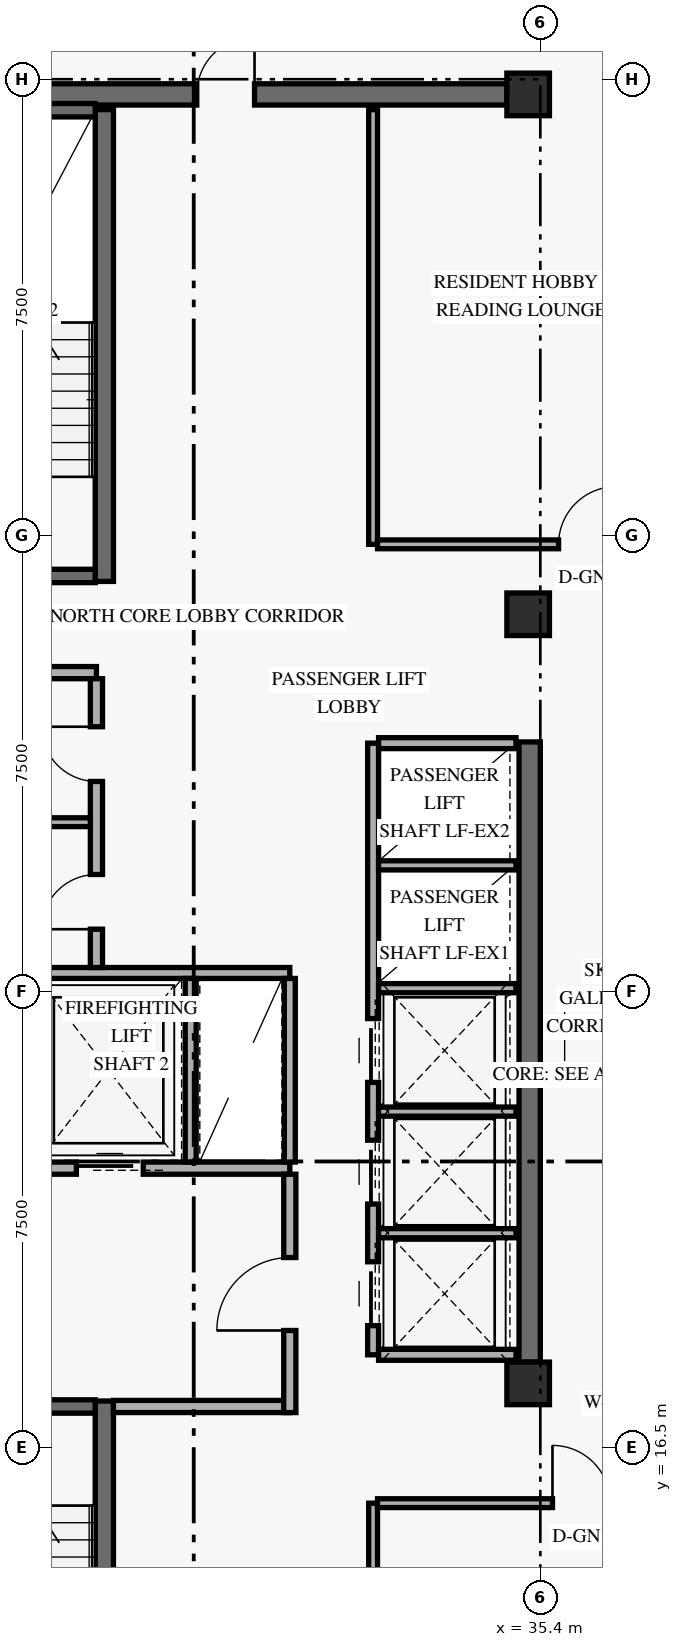
"""IFC4 building model, lengths in metres.
Left out: names, types, materials, properties, quantities, classifications, styles, units other than length and angle.
Written with IfcOpenShell. Run it as: python <this file> out.ifc"""

import sys

from ifc_helpers import new_model, si_unit, direction, frame, frame_2d, origin, origin_2d, place, context, subcontext, project, spatial, rectangle, extrude, element, fill, save


model = new_model("IFC4")
c1 = context("Model", 3, precision=1e-05, world=origin(), true_north=direction((0.0, 1.0)))
c2 = subcontext(c1, "Body", "Model", "MODEL_VIEW")
j1 = project(units=[si_unit("LENGTHUNIT", "METRE"), si_unit("PLANEANGLEUNIT", "RADIAN")], contexts=[c1])
p1 = place(None, origin())
s1 = spatial("IfcSite", under=j1, at=p1, CompositionType="ELEMENT")
p2 = place(p1, origin())
s2 = spatial("IfcBuilding", under=s1, at=p2, CompositionType="ELEMENT")
p3 = place(p2, frame((0.0, 0.0, 242.4)))
s3 = spatial("IfcBuildingStorey", under=s2, at=p3, CompositionType="ELEMENT", Elevation=242.4)
p4 = place(p3, frame((35.225, 17.9, 0.0), z_axis=(0.0, 0.0, 1.0), x_axis=(0.0, 1.0, 0.0)))
e1 = element("IfcWall", 1, at=p4, inside=s3, PredefinedType="SHEAR", context=c2, shape_type="SweptSolid", body=[
    extrude(rectangle(XDim=10.2, YDim=0.35, at=frame_2d((5.1, 0.0))), origin(), (0.0, 0.0, 1.0), 2.821),
])
p5 = place(p3, frame((24.55, 38.75, 0.0), z_axis=(0.0, 0.0, 1.0), x_axis=(1.0, 0.0, 0.0)))
e2 = element("IfcWall", 2, at=p5, inside=s3, PredefinedType="SHEAR", context=c2, shape_type="SweptSolid", body=[
    extrude(rectangle(XDim=10.3, YDim=0.35, at=frame_2d((5.15, 0.0))), origin(), (0.0, 0.0, 1.0), 3.36),
])
p6 = place(p5, frame((5.2, 0.0, 0.0)))
e3 = element("IfcOpeningElement", 3, at=p6, cuts=e2, PredefinedType="OPENING", context=c2, shape_type="SweptSolid", body=[
    extrude(rectangle(XDim=0.95, YDim=2.15, at=frame_2d((0.475, 1.075))), frame((0.0, 0.185, 0.0), z_axis=(0.0, -1.0, 0.0), x_axis=(1.0, 0.0, 0.0)), (0.0, 0.0, 1.0), 0.37),
])
p7 = place(p3, frame((28.23, 9.5, 0.0), z_axis=(0.0, 0.0, 1.0), x_axis=(0.0, 1.0, 0.0)))
e4 = element("IfcWall", 4, at=p7, inside=s3, PredefinedType="SHEAR", context=c2, shape_type="SweptSolid", body=[
    extrude(rectangle(XDim=7.76, YDim=0.3, at=frame_2d((3.88, 0.0))), origin(), (0.0, 0.0, 1.0), 3.36),
])
p8 = place(p3, frame((24.92, 17.17, 0.0), z_axis=(0.0, 0.0, 1.0), x_axis=(1.0, 0.0, 0.0)))
e5 = element("IfcWall", 5, at=p8, inside=s3, PredefinedType="SHEAR", context=c2, shape_type="SweptSolid", body=[
    extrude(rectangle(XDim=3.16, YDim=0.22, at=frame_2d((1.58, 0.0))), origin(), (0.0, 0.0, 1.0), 3.36),
])
p9 = place(p8, frame((0.78, 0.0, 0.0)))
e6 = element("IfcOpeningElement", 6, at=p9, cuts=e5, PredefinedType="OPENING", context=c2, shape_type="SweptSolid", body=[
    extrude(rectangle(XDim=1.05, YDim=2.15, at=frame_2d((0.525, 1.075))), frame((0.0, 0.12, 0.0), z_axis=(0.0, -1.0, 0.0), x_axis=(1.0, 0.0, 0.0)), (0.0, 0.0, 1.0), 0.24),
])
p10 = place(p3, frame((28.23, 30.74, 0.0), z_axis=(0.0, 0.0, 1.0), x_axis=(0.0, 1.0, 0.0)))
e7 = element("IfcWall", 7, at=p10, inside=s3, PredefinedType="SHEAR", context=c2, shape_type="SweptSolid", body=[
    extrude(rectangle(XDim=7.76, YDim=0.3, at=frame_2d((3.88, 0.0))), origin(), (0.0, 0.0, 1.0), 3.36),
])
p11 = place(p3, frame((24.92, 30.83, 0.0), z_axis=(0.0, 0.0, 1.0), x_axis=(1.0, 0.0, 0.0)))
e8 = element("IfcWall", 8, at=p11, inside=s3, PredefinedType="SHEAR", context=c2, shape_type="SweptSolid", body=[
    extrude(rectangle(XDim=3.16, YDim=0.22, at=frame_2d((1.58, 0.0))), origin(), (0.0, 0.0, 1.0), 3.36),
])
p12 = place(p11, frame((0.78, 0.0, 0.0)))
e9 = element("IfcOpeningElement", 9, at=p12, cuts=e8, PredefinedType="OPENING", context=c2, shape_type="SweptSolid", body=[
    extrude(rectangle(XDim=1.05, YDim=2.15, at=frame_2d((0.525, 1.075))), frame((0.0, 0.12, 0.0), z_axis=(0.0, -1.0, 0.0), x_axis=(1.0, 0.0, 0.0)), (0.0, 0.0, 1.0), 0.24),
])
p13 = place(p3, frame((24.92, 38.49, 0.0), z_axis=(0.0, 0.0, 1.0), x_axis=(1.0, 0.0, 0.0)))
e10 = element("IfcWall", 10, at=p13, inside=s3, PredefinedType="SHEAR", context=c2, shape_type="SweptSolid", body=[
    extrude(rectangle(XDim=3.16, YDim=0.22, at=frame_2d((1.58, 0.0))), origin(), (0.0, 0.0, 1.0), 3.36),
])
for number, where, z_axis, x_axis in (
    (11, (35.2, 17.55, 0.0), (0.0, 0.0, 1.0), (1.0, 0.0, 0.0)),
    (12, (35.2, 30.2, 0.0), (0.0, 0.0, 1.0), (1.0, 0.0, 0.0)),
    (13, (35.2, 38.75, 0.0), (0.0, 0.0, 1.0), (1.0, 0.0, 0.0)),
):
    element("IfcColumn", number, at=place(p3, frame(where, z_axis=z_axis, x_axis=x_axis)), inside=s3, PredefinedType="COLUMN", context=c2, shape_type="SweptSolid", body=[
        extrude(rectangle(XDim=0.7, YDim=0.7, at=origin_2d()), origin(), (0.0, 0.0, 1.0), 3.6),
    ])
p14 = place(p3, frame((24.45, 21.09, 0.0), z_axis=(0.0, 0.0, 1.0), x_axis=(1.0, 0.0, 0.0)))
e14 = element("IfcWall", 14, at=p14, inside=s3, PredefinedType="STANDARD", context=c2, shape_type="SweptSolid", body=[
    extrude(rectangle(XDim=6.83, YDim=0.2, at=frame_2d((3.415, 0.0))), origin(), (0.0, 0.0, 1.0), 3.36),
])
p15 = place(p14, frame((0.72, 0.0, 0.0)))
e15 = element("IfcOpeningElement", 15, at=p15, cuts=e14, PredefinedType="OPENING", context=c2, shape_type="SweptSolid", body=[
    extrude(rectangle(XDim=1.1, YDim=2.2, at=frame_2d((0.55, 1.1))), frame((0.0, 0.11, 0.0), z_axis=(0.0, -1.0, 0.0), x_axis=(1.0, 0.0, 0.0)), (0.0, 0.0, 1.0), 0.22),
])
p16 = place(p14, frame((3.32, 0.0, 0.0)))
e16 = element("IfcOpeningElement", 16, at=p16, cuts=e14, PredefinedType="OPENING", context=c2, shape_type="SweptSolid", body=[
    extrude(rectangle(XDim=1.1, YDim=2.2, at=frame_2d((0.55, 1.1))), frame((0.0, 0.11, 0.0), z_axis=(0.0, -1.0, 0.0), x_axis=(1.0, 0.0, 0.0)), (0.0, 0.0, 1.0), 0.22),
])
p17 = place(p3, frame((28.38, 17.17, 0.0), z_axis=(0.0, 0.0, 1.0), x_axis=(1.0, 0.0, 0.0)))
e17 = element("IfcWall", 17, at=p17, inside=s3, PredefinedType="STANDARD", context=c2, shape_type="SweptSolid", body=[
    extrude(rectangle(XDim=2.9, YDim=0.2, at=frame_2d((1.45, 0.0))), origin(), (0.0, 0.0, 1.0), 3.36),
])
p18 = place(p3, frame((31.28, 17.07, 0.0), z_axis=(0.0, 0.0, 1.0), x_axis=(0.0, 1.0, 0.0)))
e18 = element("IfcWall", 18, at=p18, inside=s3, PredefinedType="STANDARD", context=c2, shape_type="SweptSolid", body=[
    extrude(rectangle(XDim=3.92, YDim=0.2, at=frame_2d((1.96, 0.0))), origin(), (0.0, 0.0, 1.0), 2.803),
])
p19 = place(p18, frame((1.35, 0.0, 0.0)))
e19 = element("IfcOpeningElement", 19, at=p19, cuts=e18, PredefinedType="OPENING", context=c2, shape_type="SweptSolid", body=[
    extrude(rectangle(XDim=1.2, YDim=2.15, at=frame_2d((0.6, 1.075))), frame((0.0, 0.11, 0.0), z_axis=(0.0, -1.0, 0.0), x_axis=(1.0, 0.0, 0.0)), (0.0, 0.0, 1.0), 0.22),
])
p20 = place(p3, frame((24.45, 24.3, 0.0), z_axis=(0.0, 0.0, 1.0), x_axis=(1.0, 0.0, 0.0)))
e20 = element("IfcWall", 20, at=p20, inside=s3, PredefinedType="STANDARD", context=c2, shape_type="SweptSolid", body=[
    extrude(rectangle(XDim=6.83, YDim=0.18, at=frame_2d((3.415, 0.0))), origin(), (0.0, 0.0, 1.0), 3.36),
])
for number, where, z_axis, x_axis in (
    (21, (29.65, 21.19, 0.0), (0.0, 0.0, 1.0), (0.0, 1.0, 0.0)),
    (22, (31.28, 21.19, 0.0), (0.0, 0.0, 1.0), (0.0, 1.0, 0.0)),
):
    element("IfcWall", number, at=place(p3, frame(where, z_axis=z_axis, x_axis=x_axis)), inside=s3, PredefinedType="STANDARD", context=c2, shape_type="SweptSolid", body=[
        extrude(rectangle(XDim=3.02, YDim=0.18, at=frame_2d((1.51, 0.0))), origin(), (0.0, 0.0, 1.0), 3.36),
    ])
p21 = place(p3, frame((24.45, 29.24, 0.0), z_axis=(0.0, 0.0, 1.0), x_axis=(1.0, 0.0, 0.0)))
e23 = element("IfcWall", 23, at=p21, inside=s3, PredefinedType="STANDARD", context=c2, shape_type="SweptSolid", body=[
    extrude(rectangle(XDim=3.65, YDim=0.2, at=frame_2d((1.825, 0.0))), origin(), (0.0, 0.0, 1.0), 3.36),
])
p22 = place(p3, frame((28.1, 24.39, 0.0), z_axis=(0.0, 0.0, 1.0), x_axis=(0.0, 1.0, 0.0)))
e24 = element("IfcWall", 24, at=p22, inside=s3, PredefinedType="STANDARD", context=c2, shape_type="SweptSolid", body=[
    extrude(rectangle(XDim=4.75, YDim=0.2, at=frame_2d((2.375, 0.0))), origin(), (0.0, 0.0, 1.0), 3.36),
])
p23 = place(p22, frame((0.63, 0.0, 0.0)))
e25 = element("IfcOpeningElement", 25, at=p23, cuts=e24, PredefinedType="OPENING", context=c2, shape_type="SweptSolid", body=[
    extrude(rectangle(XDim=0.9, YDim=2.1, at=frame_2d((0.45, 1.05))), frame((0.0, 0.11, 0.0), z_axis=(0.0, -1.0, 0.0), x_axis=(1.0, 0.0, 0.0)), (0.0, 0.0, 1.0), 0.22),
])
p24 = place(p22, frame((3.06, 0.0, 0.0)))
e26 = element("IfcOpeningElement", 26, at=p24, cuts=e24, PredefinedType="OPENING", context=c2, shape_type="SweptSolid", body=[
    extrude(rectangle(XDim=0.9, YDim=2.1, at=frame_2d((0.45, 1.05))), frame((0.0, 0.11, 0.0), z_axis=(0.0, -1.0, 0.0), x_axis=(1.0, 0.0, 0.0)), (0.0, 0.0, 1.0), 0.22),
])
p25 = place(p3, frame((24.45, 26.78, 0.0), z_axis=(0.0, 0.0, 1.0), x_axis=(1.0, 0.0, 0.0)))
e27 = element("IfcWall", 27, at=p25, inside=s3, PredefinedType="PARTITIONING", context=c2, shape_type="SweptSolid", body=[
    extrude(rectangle(XDim=3.55, YDim=0.145, at=frame_2d((1.775, 0.0))), origin(), (0.0, 0.0, 1.0), 3.36),
])
p26 = place(p3, frame((32.65, 18.02, 0.0), z_axis=(0.0, 0.0, 1.0), x_axis=(0.0, 1.0, 0.0)))
e28 = element("IfcWall", 28, at=p26, inside=s3, PredefinedType="STANDARD", context=c2, shape_type="SweptSolid", body=[
    extrude(rectangle(XDim=10.06, YDim=0.18, at=frame_2d((5.03, 0.0))), origin(), (0.0, 0.0, 1.0), 3.36),
])
p27 = place(p26, frame((0.48, 0.0, 0.0)))
e29 = element("IfcOpeningElement", 29, at=p27, cuts=e28, PredefinedType="OPENING", context=c2, shape_type="SweptSolid", body=[
    extrude(rectangle(XDim=1.05, YDim=2.2, at=frame_2d((0.525, 1.1))), frame((0.0, 0.1, 0.0), z_axis=(0.0, -1.0, 0.0), x_axis=(1.0, 0.0, 0.0)), (0.0, 0.0, 1.0), 0.2),
])
p28 = place(p26, frame((2.48, 0.0, 0.0)))
e30 = element("IfcOpeningElement", 30, at=p28, cuts=e28, PredefinedType="OPENING", context=c2, shape_type="SweptSolid", body=[
    extrude(rectangle(XDim=1.05, YDim=2.2, at=frame_2d((0.525, 1.1))), frame((0.0, 0.1, 0.0), z_axis=(0.0, -1.0, 0.0), x_axis=(1.0, 0.0, 0.0)), (0.0, 0.0, 1.0), 0.2),
])
p29 = place(p26, frame((4.48, 0.0, 0.0)))
e31 = element("IfcOpeningElement", 31, at=p29, cuts=e28, PredefinedType="OPENING", context=c2, shape_type="SweptSolid", body=[
    extrude(rectangle(XDim=1.05, YDim=2.2, at=frame_2d((0.525, 1.1))), frame((0.0, 0.1, 0.0), z_axis=(0.0, -1.0, 0.0), x_axis=(1.0, 0.0, 0.0)), (0.0, 0.0, 1.0), 0.2),
])
for number, where, z_axis, x_axis in (
    (32, (32.74, 18.02, 0.0), (0.0, 0.0, 1.0), (1.0, 0.0, 0.0)),
    (33, (32.74, 28.08, 0.0), (0.0, 0.0, 1.0), (1.0, 0.0, 0.0)),
):
    element("IfcWall", number, at=place(p3, frame(where, z_axis=z_axis, x_axis=x_axis)), inside=s3, PredefinedType="STANDARD", context=c2, shape_type="SweptSolid", body=[
        extrude(rectangle(XDim=2.26, YDim=0.18, at=frame_2d((1.13, 0.0))), origin(), (0.0, 0.0, 1.0), 3.36),
    ])
for number, where, z_axis, x_axis in (
    (34, (32.74, 20.02, 0.0), (0.0, 0.0, 1.0), (1.0, 0.0, 0.0)),
    (35, (32.74, 22.02, 0.0), (0.0, 0.0, 1.0), (1.0, 0.0, 0.0)),
    (36, (32.74, 24.05, 0.0), (0.0, 0.0, 1.0), (1.0, 0.0, 0.0)),
    (37, (32.74, 26.07, 0.0), (0.0, 0.0, 1.0), (1.0, 0.0, 0.0)),
):
    element("IfcWall", number, at=place(p3, frame(where, z_axis=z_axis, x_axis=x_axis)), inside=s3, PredefinedType="STANDARD", context=c2, shape_type="SweptSolid", body=[
        extrude(rectangle(XDim=2.26, YDim=0.15, at=frame_2d((1.13, 0.0))), origin(), (0.0, 0.0, 1.0), 3.36),
    ])
p30 = place(p3, frame((32.65, 9.5, 0.0), z_axis=(0.0, 0.0, 1.0), x_axis=(0.0, 1.0, 0.0)))
e38 = element("IfcWall", 38, at=p30, inside=s3, PredefinedType="PARTITIONING", context=c2, shape_type="SweptSolid", body=[
    extrude(rectangle(XDim=6.08, YDim=0.145, at=frame_2d((3.04, 0.0))), origin(), (0.0, 0.0, 1.0), 3.36),
])
p31 = place(p3, frame((32.722, 15.58, 0.0), z_axis=(0.0, 0.0, 1.0), x_axis=(1.0, 0.0, 0.0)))
e39 = element("IfcWall", 39, at=p31, inside=s3, PredefinedType="PARTITIONING", context=c2, shape_type="SweptSolid", body=[
    extrude(rectangle(XDim=4.828, YDim=0.145, at=frame_2d((2.414, 0.0))), origin(), (0.0, 0.0, 1.0), 2.803),
])
p32 = place(p31, frame((2.877, 0.0, 0.0)))
e40 = element("IfcOpeningElement", 40, at=p32, cuts=e39, PredefinedType="OPENING", context=c2, shape_type="SweptSolid", body=[
    extrude(rectangle(XDim=0.95, YDim=2.15, at=frame_2d((0.475, 1.075))), frame((0.0, 0.083, 0.0), z_axis=(0.0, -1.0, 0.0), x_axis=(1.0, 0.0, 0.0)), (0.0, 0.0, 1.0), 0.165),
])
p33 = place(p3, frame((32.65, 31.35, 0.0), z_axis=(0.0, 0.0, 1.0), x_axis=(0.0, 1.0, 0.0)))
e41 = element("IfcWall", 41, at=p33, inside=s3, PredefinedType="PARTITIONING", context=c2, shape_type="SweptSolid", body=[
    extrude(rectangle(XDim=7.15, YDim=0.145, at=frame_2d((3.575, 0.0))), origin(), (0.0, 0.0, 1.0), 3.36),
])
p34 = place(p3, frame((32.722, 31.35, 0.0), z_axis=(0.0, 0.0, 1.0), x_axis=(1.0, 0.0, 0.0)))
e42 = element("IfcWall", 42, at=p34, inside=s3, PredefinedType="PARTITIONING", context=c2, shape_type="SweptSolid", body=[
    extrude(rectangle(XDim=5.378, YDim=0.145, at=frame_2d((2.689, 0.0))), origin(), (0.0, 0.0, 1.0), 2.803),
])
p35 = place(p34, frame((2.978, 0.0, 0.0)))
e43 = element("IfcOpeningElement", 43, at=p35, cuts=e42, PredefinedType="OPENING", context=c2, shape_type="SweptSolid", body=[
    extrude(rectangle(XDim=0.95, YDim=2.15, at=frame_2d((0.475, 1.075))), frame((0.0, 0.083, 0.0), z_axis=(0.0, -1.0, 0.0), x_axis=(1.0, 0.0, 0.0)), (0.0, 0.0, 1.0), 0.165),
])
p36 = place(p16, origin())
e44 = element("IfcDoor", 44, at=p36, inside=s3, OperationType="SLIDING_TO_LEFT", PredefinedType="DOOR", context=c2, shape_type="SweptSolid", body=[
    extrude(rectangle(XDim=1.1, YDim=2.2, at=frame_2d((0.55, 1.1))), frame((0.0, 0.025, 0.0), z_axis=(0.0, -1.0, 0.0), x_axis=(1.0, 0.0, 0.0)), (0.0, 0.0, 1.0), 0.05),
])
fill(e16, e44)
p37 = place(p19, origin())
e45 = element("IfcDoor", 45, at=p37, inside=s3, OperationType="SINGLE_SWING_LEFT", PredefinedType="DOOR", context=c2, shape_type="SweptSolid", body=[
    extrude(rectangle(XDim=1.2, YDim=2.15, at=frame_2d((0.6, 1.075))), frame((0.0, 0.025, 0.0), z_axis=(0.0, -1.0, 0.0), x_axis=(1.0, 0.0, 0.0)), (0.0, 0.0, 1.0), 0.05),
])
fill(e19, e45)
p38 = place(p23, origin())
e46 = element("IfcDoor", 46, at=p38, inside=s3, OperationType="SINGLE_SWING_LEFT", PredefinedType="DOOR", context=c2, shape_type="SweptSolid", body=[
    extrude(rectangle(XDim=0.9, YDim=2.1, at=frame_2d((0.45, 1.05))), frame((0.0, 0.025, 0.0), z_axis=(0.0, -1.0, 0.0), x_axis=(1.0, 0.0, 0.0)), (0.0, 0.0, 1.0), 0.05),
])
fill(e25, e46)
p39 = place(p24, origin())
e47 = element("IfcDoor", 47, at=p39, inside=s3, OperationType="SINGLE_SWING_RIGHT", PredefinedType="DOOR", context=c2, shape_type="SweptSolid", body=[
    extrude(rectangle(XDim=0.9, YDim=2.1, at=frame_2d((0.45, 1.05))), frame((0.0, 0.025, 0.0), z_axis=(0.0, -1.0, 0.0), x_axis=(1.0, 0.0, 0.0)), (0.0, 0.0, 1.0), 0.05),
])
fill(e26, e47)
p40 = place(p27, origin())
e48 = element("IfcDoor", 48, at=p40, inside=s3, OperationType="SLIDING_TO_LEFT", PredefinedType="DOOR", context=c2, shape_type="SweptSolid", body=[
    extrude(rectangle(XDim=1.05, YDim=2.2, at=frame_2d((0.525, 1.1))), frame((0.0, 0.025, 0.0), z_axis=(0.0, -1.0, 0.0), x_axis=(1.0, 0.0, 0.0)), (0.0, 0.0, 1.0), 0.05),
])
fill(e29, e48)
p41 = place(p28, origin())
e49 = element("IfcDoor", 49, at=p41, inside=s3, OperationType="SLIDING_TO_LEFT", PredefinedType="DOOR", context=c2, shape_type="SweptSolid", body=[
    extrude(rectangle(XDim=1.05, YDim=2.2, at=frame_2d((0.525, 1.1))), frame((0.0, 0.025, 0.0), z_axis=(0.0, -1.0, 0.0), x_axis=(1.0, 0.0, 0.0)), (0.0, 0.0, 1.0), 0.05),
])
fill(e30, e49)
p42 = place(p29, origin())
e50 = element("IfcDoor", 50, at=p42, inside=s3, OperationType="SLIDING_TO_LEFT", PredefinedType="DOOR", context=c2, shape_type="SweptSolid", body=[
    extrude(rectangle(XDim=1.05, YDim=2.2, at=frame_2d((0.525, 1.1))), frame((0.0, 0.025, 0.0), z_axis=(0.0, -1.0, 0.0), x_axis=(1.0, 0.0, 0.0)), (0.0, 0.0, 1.0), 0.05),
])
fill(e31, e50)
p43 = place(p32, origin())
e51 = element("IfcDoor", 51, at=p43, inside=s3, OperationType="SINGLE_SWING_LEFT", PredefinedType="DOOR", context=c2, shape_type="SweptSolid", body=[
    extrude(rectangle(XDim=0.95, YDim=2.15, at=frame_2d((0.475, 1.075))), frame((0.0, 0.025, 0.0), z_axis=(0.0, -1.0, 0.0), x_axis=(1.0, 0.0, 0.0)), (0.0, 0.0, 1.0), 0.05),
])
fill(e40, e51)
p44 = place(p35, origin())
e52 = element("IfcDoor", 52, at=p44, inside=s3, OperationType="SINGLE_SWING_RIGHT", PredefinedType="DOOR", context=c2, shape_type="SweptSolid", body=[
    extrude(rectangle(XDim=0.95, YDim=2.15, at=frame_2d((0.475, 1.075))), frame((0.0, 0.025, 0.0), z_axis=(0.0, -1.0, 0.0), x_axis=(1.0, 0.0, 0.0)), (0.0, 0.0, 1.0), 0.05),
])
fill(e43, e52)
p45 = place(p6, origin())
e53 = element("IfcDoor", 53, at=p45, inside=s3, OperationType="SINGLE_SWING_RIGHT", PredefinedType="DOOR", context=c2, shape_type="SweptSolid", body=[
    extrude(rectangle(XDim=0.95, YDim=2.15, at=frame_2d((0.475, 1.075))), frame((0.0, 0.025, 0.0), z_axis=(0.0, -1.0, 0.0), x_axis=(1.0, 0.0, 0.0)), (0.0, 0.0, 1.0), 0.05),
])
fill(e3, e53)
save(model, sys.argv[1])
